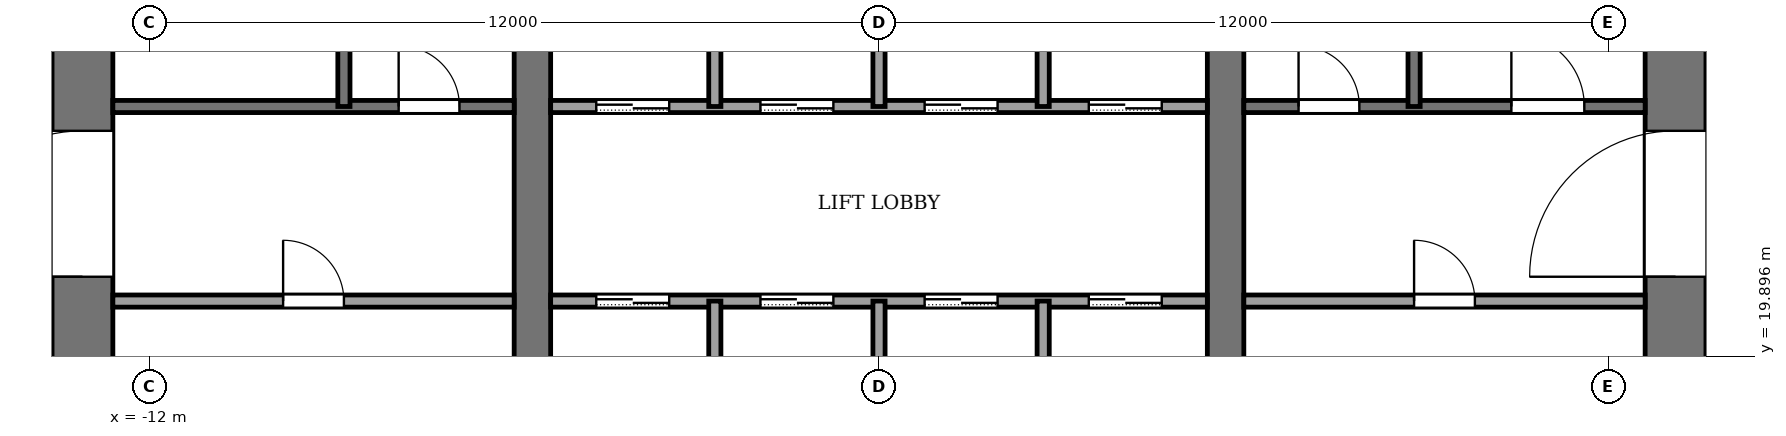
"""IFC4 building model, lengths in metres.
Left out: names, types, materials, properties, quantities, classifications, styles, units other than length and angle.
Written with IfcOpenShell. Run it as: python <this file> out.ifc"""

import sys

from ifc_helpers import new_model, si_unit, direction, frame, frame_2d, origin, place, context, subcontext, project, spatial, rectangle, extrude, element, fill, save


model = new_model("IFC4")
c1 = context("Model", 3, precision=1e-05, world=origin(), true_north=direction((0.0, 1.0)))
c2 = subcontext(c1, "Body", "Model", "MODEL_VIEW")
j1 = project(units=[si_unit("LENGTHUNIT", "METRE"), si_unit("PLANEANGLEUNIT", "RADIAN")], contexts=[c1])
p1 = place(None, origin())
s1 = spatial("IfcSite", under=j1, at=p1, CompositionType="ELEMENT")
p2 = place(p1, origin())
s2 = spatial("IfcBuilding", under=s1, at=p2, CompositionType="ELEMENT")
p3 = place(p2, frame((0.0, 0.0, 154.0)))
s3 = spatial("IfcBuildingStorey", under=s2, at=p3, CompositionType="ELEMENT", Elevation=154.0)
p4 = place(p3, frame((-13.1, 18.4, -0.13), z_axis=(0.0, 0.0, 1.0), x_axis=(0.0, 1.0, 0.0)))
e1 = element("IfcWall", 1, at=p4, inside=s3, PredefinedType="SHEAR", context=c2, shape_type="SweptSolid", body=[
    extrude(rectangle(XDim=19.2, YDim=1.0, at=frame_2d((9.6, 0.0))), origin(), (0.0, 0.0, 1.0), 4.0),
])
p5 = place(p4, frame((2.8, 0.0, 0.13)))
e2 = element("IfcOpeningElement", 2, at=p5, cuts=e1, PredefinedType="OPENING", context=c2, shape_type="SweptSolid", body=[
    extrude(rectangle(XDim=2.4, YDim=2.4, at=frame_2d((1.2, 1.2))), frame((0.0, 0.51, 0.0), z_axis=(0.0, -1.0, 0.0), x_axis=(1.0, 0.0, 0.0)), (0.0, 0.0, 1.0), 1.02),
])
p6 = place(p4, frame((13.4, 0.0, 0.13)))
e3 = element("IfcOpeningElement", 3, at=p6, cuts=e1, PredefinedType="OPENING", context=c2, shape_type="SweptSolid", body=[
    extrude(rectangle(XDim=1.4, YDim=2.2, at=frame_2d((0.7, 1.1))), frame((0.0, 0.51, 0.0), z_axis=(0.0, -1.0, 0.0), x_axis=(1.0, 0.0, 0.0)), (0.0, 0.0, 1.0), 1.02),
])
p7 = place(p3, frame((13.1, 18.4, -0.13), z_axis=(0.0, 0.0, 1.0), x_axis=(0.0, 1.0, 0.0)))
e4 = element("IfcWall", 4, at=p7, inside=s3, PredefinedType="SHEAR", context=c2, shape_type="SweptSolid", body=[
    extrude(rectangle(XDim=19.2, YDim=1.0, at=frame_2d((9.6, 0.0))), origin(), (0.0, 0.0, 1.0), 4.0),
])
p8 = place(p7, frame((2.8, 0.0, 0.13)))
e5 = element("IfcOpeningElement", 5, at=p8, cuts=e4, PredefinedType="OPENING", context=c2, shape_type="SweptSolid", body=[
    extrude(rectangle(XDim=2.4, YDim=2.4, at=frame_2d((1.2, 1.2))), frame((0.0, 0.51, 0.0), z_axis=(0.0, -1.0, 0.0), x_axis=(1.0, 0.0, 0.0)), (0.0, 0.0, 1.0), 1.02),
])
p9 = place(p7, frame((13.3, 0.0, 0.13)))
e6 = element("IfcOpeningElement", 6, at=p9, cuts=e4, PredefinedType="OPENING", context=c2, shape_type="SweptSolid", body=[
    extrude(rectangle(XDim=2.4, YDim=2.4, at=frame_2d((1.2, 1.2))), frame((0.0, 0.51, 0.0), z_axis=(0.0, -1.0, 0.0), x_axis=(1.0, 0.0, 0.0)), (0.0, 0.0, 1.0), 1.02),
])
p10 = place(p3, frame((-5.7, 18.4, -0.13), z_axis=(0.0, 0.0, 1.0), x_axis=(0.0, 1.0, 0.0)))
e7 = element("IfcWall", 7, at=p10, inside=s3, PredefinedType="SHEAR", context=c2, shape_type="SweptSolid", body=[
    extrude(rectangle(XDim=19.2, YDim=0.6, at=frame_2d((9.6, 0.0))), origin(), (0.0, 0.0, 1.0), 4.0),
])
p11 = place(p10, frame((8.35, 0.0, 0.13)))
e8 = element("IfcOpeningElement", 8, at=p11, cuts=e7, PredefinedType="OPENING", context=c2, shape_type="SweptSolid", body=[
    extrude(rectangle(XDim=0.9, YDim=2.1, at=frame_2d((0.45, 1.05))), frame((0.0, 0.31, 0.0), z_axis=(0.0, -1.0, 0.0), x_axis=(1.0, 0.0, 0.0)), (0.0, 0.0, 1.0), 0.62),
])
p12 = place(p3, frame((5.7, 18.4, -0.13), z_axis=(0.0, 0.0, 1.0), x_axis=(0.0, 1.0, 0.0)))
e9 = element("IfcWall", 9, at=p12, inside=s3, PredefinedType="SHEAR", context=c2, shape_type="SweptSolid", body=[
    extrude(rectangle(XDim=19.2, YDim=0.6, at=frame_2d((9.6, 0.0))), origin(), (0.0, 0.0, 1.0), 4.0),
])
p13 = place(p12, frame((13.3, 0.0, 0.13)))
e10 = element("IfcOpeningElement", 10, at=p13, cuts=e9, PredefinedType="OPENING", context=c2, shape_type="SweptSolid", body=[
    extrude(rectangle(XDim=2.4, YDim=2.4, at=frame_2d((1.2, 1.2))), frame((0.0, 0.31, 0.0), z_axis=(0.0, -1.0, 0.0), x_axis=(1.0, 0.0, 0.0)), (0.0, 0.0, 1.0), 0.62),
])
p14 = place(p3, frame((-12.6, 20.8, 0.0), z_axis=(0.0, 0.0, 1.0), x_axis=(1.0, 0.0, 0.0)))
e11 = element("IfcWall", 11, at=p14, inside=s3, PredefinedType="PARTITIONING", context=c2, shape_type="SweptSolid", body=[
    extrude(rectangle(XDim=6.6, YDim=0.2, at=frame_2d((3.3, 0.0))), origin(), (0.0, 0.0, 1.0), 3.87),
])
p15 = place(p14, frame((2.8, 0.0, 0.0)))
e12 = element("IfcOpeningElement", 12, at=p15, cuts=e11, PredefinedType="OPENING", context=c2, shape_type="SweptSolid", body=[
    extrude(rectangle(XDim=1.0, YDim=2.1, at=frame_2d((0.5, 1.05))), frame((0.0, 0.11, 0.0), z_axis=(0.0, -1.0, 0.0), x_axis=(1.0, 0.0, 0.0)), (0.0, 0.0, 1.0), 0.22),
])
p16 = place(p3, frame((-5.4, 20.8, 0.0), z_axis=(0.0, 0.0, 1.0), x_axis=(1.0, 0.0, 0.0)))
e13 = element("IfcWall", 13, at=p16, inside=s3, PredefinedType="PARTITIONING", context=c2, shape_type="SweptSolid", body=[
    extrude(rectangle(XDim=10.8, YDim=0.2, at=frame_2d((5.4, 0.0))), origin(), (0.0, 0.0, 1.0), 3.87),
])
p17 = place(p16, frame((0.75, 0.0, 0.0)))
e14 = element("IfcOpeningElement", 14, at=p17, cuts=e13, PredefinedType="OPENING", context=c2, shape_type="SweptSolid", body=[
    extrude(rectangle(XDim=1.2, YDim=2.2, at=frame_2d((0.6, 1.1))), frame((0.0, 0.11, 0.0), z_axis=(0.0, -1.0, 0.0), x_axis=(1.0, 0.0, 0.0)), (0.0, 0.0, 1.0), 0.22),
])
p18 = place(p16, frame((3.45, 0.0, 0.0)))
e15 = element("IfcOpeningElement", 15, at=p18, cuts=e13, PredefinedType="OPENING", context=c2, shape_type="SweptSolid", body=[
    extrude(rectangle(XDim=1.2, YDim=2.2, at=frame_2d((0.6, 1.1))), frame((0.0, 0.11, 0.0), z_axis=(0.0, -1.0, 0.0), x_axis=(1.0, 0.0, 0.0)), (0.0, 0.0, 1.0), 0.22),
])
p19 = place(p16, frame((6.15, 0.0, 0.0)))
e16 = element("IfcOpeningElement", 16, at=p19, cuts=e13, PredefinedType="OPENING", context=c2, shape_type="SweptSolid", body=[
    extrude(rectangle(XDim=1.2, YDim=2.2, at=frame_2d((0.6, 1.1))), frame((0.0, 0.11, 0.0), z_axis=(0.0, -1.0, 0.0), x_axis=(1.0, 0.0, 0.0)), (0.0, 0.0, 1.0), 0.22),
])
p20 = place(p16, frame((8.85, 0.0, 0.0)))
e17 = element("IfcOpeningElement", 17, at=p20, cuts=e13, PredefinedType="OPENING", context=c2, shape_type="SweptSolid", body=[
    extrude(rectangle(XDim=1.2, YDim=2.2, at=frame_2d((0.6, 1.1))), frame((0.0, 0.11, 0.0), z_axis=(0.0, -1.0, 0.0), x_axis=(1.0, 0.0, 0.0)), (0.0, 0.0, 1.0), 0.22),
])
p21 = place(p3, frame((6.0, 20.8, 0.0), z_axis=(0.0, 0.0, 1.0), x_axis=(1.0, 0.0, 0.0)))
e18 = element("IfcWall", 18, at=p21, inside=s3, PredefinedType="PARTITIONING", context=c2, shape_type="SweptSolid", body=[
    extrude(rectangle(XDim=6.6, YDim=0.2, at=frame_2d((3.3, 0.0))), origin(), (0.0, 0.0, 1.0), 3.87),
])
p22 = place(p21, frame((2.8, 0.0, 0.0)))
e19 = element("IfcOpeningElement", 19, at=p22, cuts=e18, PredefinedType="OPENING", context=c2, shape_type="SweptSolid", body=[
    extrude(rectangle(XDim=1.0, YDim=2.1, at=frame_2d((0.5, 1.05))), frame((0.0, 0.11, 0.0), z_axis=(0.0, -1.0, 0.0), x_axis=(1.0, 0.0, 0.0)), (0.0, 0.0, 1.0), 0.22),
])
p23 = place(p3, frame((-12.6, 24.0, 0.0), z_axis=(0.0, 0.0, 1.0), x_axis=(1.0, 0.0, 0.0)))
e20 = element("IfcWall", 20, at=p23, inside=s3, PredefinedType="PARTITIONING", context=c2, shape_type="SweptSolid", body=[
    extrude(rectangle(XDim=6.6, YDim=0.2, at=frame_2d((3.3, 0.0))), origin(), (0.0, 0.0, 1.0), 3.87),
])
p24 = place(p23, frame((4.7, 0.0, 0.0)))
e21 = element("IfcOpeningElement", 21, at=p24, cuts=e20, PredefinedType="OPENING", context=c2, shape_type="SweptSolid", body=[
    extrude(rectangle(XDim=1.0, YDim=2.1, at=frame_2d((0.5, 1.05))), frame((0.0, 0.11, 0.0), z_axis=(0.0, -1.0, 0.0), x_axis=(1.0, 0.0, 0.0)), (0.0, 0.0, 1.0), 0.22),
])
p25 = place(p3, frame((-5.4, 24.0, 0.0), z_axis=(0.0, 0.0, 1.0), x_axis=(1.0, 0.0, 0.0)))
e22 = element("IfcWall", 22, at=p25, inside=s3, PredefinedType="PARTITIONING", context=c2, shape_type="SweptSolid", body=[
    extrude(rectangle(XDim=10.8, YDim=0.2, at=frame_2d((5.4, 0.0))), origin(), (0.0, 0.0, 1.0), 3.87),
])
p26 = place(p25, frame((0.75, 0.0, 0.0)))
e23 = element("IfcOpeningElement", 23, at=p26, cuts=e22, PredefinedType="OPENING", context=c2, shape_type="SweptSolid", body=[
    extrude(rectangle(XDim=1.2, YDim=2.2, at=frame_2d((0.6, 1.1))), frame((0.0, 0.11, 0.0), z_axis=(0.0, -1.0, 0.0), x_axis=(1.0, 0.0, 0.0)), (0.0, 0.0, 1.0), 0.22),
])
p27 = place(p25, frame((3.45, 0.0, 0.0)))
e24 = element("IfcOpeningElement", 24, at=p27, cuts=e22, PredefinedType="OPENING", context=c2, shape_type="SweptSolid", body=[
    extrude(rectangle(XDim=1.2, YDim=2.2, at=frame_2d((0.6, 1.1))), frame((0.0, 0.11, 0.0), z_axis=(0.0, -1.0, 0.0), x_axis=(1.0, 0.0, 0.0)), (0.0, 0.0, 1.0), 0.22),
])
p28 = place(p25, frame((6.15, 0.0, 0.0)))
e25 = element("IfcOpeningElement", 25, at=p28, cuts=e22, PredefinedType="OPENING", context=c2, shape_type="SweptSolid", body=[
    extrude(rectangle(XDim=1.2, YDim=2.2, at=frame_2d((0.6, 1.1))), frame((0.0, 0.11, 0.0), z_axis=(0.0, -1.0, 0.0), x_axis=(1.0, 0.0, 0.0)), (0.0, 0.0, 1.0), 0.22),
])
p29 = place(p25, frame((8.85, 0.0, 0.0)))
e26 = element("IfcOpeningElement", 26, at=p29, cuts=e22, PredefinedType="OPENING", context=c2, shape_type="SweptSolid", body=[
    extrude(rectangle(XDim=1.2, YDim=2.2, at=frame_2d((0.6, 1.1))), frame((0.0, 0.11, 0.0), z_axis=(0.0, -1.0, 0.0), x_axis=(1.0, 0.0, 0.0)), (0.0, 0.0, 1.0), 0.22),
])
p30 = place(p3, frame((6.0, 24.0, 0.0), z_axis=(0.0, 0.0, 1.0), x_axis=(1.0, 0.0, 0.0)))
e27 = element("IfcWall", 27, at=p30, inside=s3, PredefinedType="PARTITIONING", context=c2, shape_type="SweptSolid", body=[
    extrude(rectangle(XDim=6.6, YDim=0.2, at=frame_2d((3.3, 0.0))), origin(), (0.0, 0.0, 1.0), 3.87),
])
p31 = place(p30, frame((0.9, 0.0, 0.0)))
e28 = element("IfcOpeningElement", 28, at=p31, cuts=e27, PredefinedType="OPENING", context=c2, shape_type="SweptSolid", body=[
    extrude(rectangle(XDim=1.0, YDim=2.1, at=frame_2d((0.5, 1.05))), frame((0.0, 0.11, 0.0), z_axis=(0.0, -1.0, 0.0), x_axis=(1.0, 0.0, 0.0)), (0.0, 0.0, 1.0), 0.22),
])
p32 = place(p30, frame((4.4, 0.0, 0.0)))
e29 = element("IfcOpeningElement", 29, at=p32, cuts=e27, PredefinedType="OPENING", context=c2, shape_type="SweptSolid", body=[
    extrude(rectangle(XDim=1.2, YDim=2.2, at=frame_2d((0.6, 1.1))), frame((0.0, 0.11, 0.0), z_axis=(0.0, -1.0, 0.0), x_axis=(1.0, 0.0, 0.0)), (0.0, 0.0, 1.0), 0.22),
])
p33 = place(p3, frame((-8.8, 24.0, 0.0), z_axis=(0.0, 0.0, 1.0), x_axis=(0.0, 1.0, 0.0)))
e30 = element("IfcWall", 30, at=p33, inside=s3, PredefinedType="PARTITIONING", context=c2, shape_type="SweptSolid", body=[
    extrude(rectangle(XDim=7.4, YDim=0.2, at=frame_2d((3.7, 0.0))), origin(), (0.0, 0.0, 1.0), 3.87),
])
p34 = place(p3, frame((-2.7, 18.4, 0.0), z_axis=(0.0, 0.0, 1.0), x_axis=(0.0, 1.0, 0.0)))
e31 = element("IfcWall", 31, at=p34, inside=s3, PredefinedType="PARTITIONING", context=c2, shape_type="SweptSolid", body=[
    extrude(rectangle(XDim=2.4, YDim=0.2, at=frame_2d((1.2, 0.0))), origin(), (0.0, 0.0, 1.0), 3.87),
])
p35 = place(p3, frame((-2.7, 24.0, 0.0), z_axis=(0.0, 0.0, 1.0), x_axis=(0.0, 1.0, 0.0)))
e32 = element("IfcWall", 32, at=p35, inside=s3, PredefinedType="PARTITIONING", context=c2, shape_type="SweptSolid", body=[
    extrude(rectangle(XDim=2.4, YDim=0.2, at=frame_2d((1.2, 0.0))), origin(), (0.0, 0.0, 1.0), 3.87),
])
p36 = place(p3, frame((0.0, 18.4, 0.0), z_axis=(0.0, 0.0, 1.0), x_axis=(0.0, 1.0, 0.0)))
e33 = element("IfcWall", 33, at=p36, inside=s3, PredefinedType="PARTITIONING", context=c2, shape_type="SweptSolid", body=[
    extrude(rectangle(XDim=2.4, YDim=0.2, at=frame_2d((1.2, 0.0))), origin(), (0.0, 0.0, 1.0), 3.87),
])
p37 = place(p3, frame((0.0, 24.0, 0.0), z_axis=(0.0, 0.0, 1.0), x_axis=(0.0, 1.0, 0.0)))
e34 = element("IfcWall", 34, at=p37, inside=s3, PredefinedType="PARTITIONING", context=c2, shape_type="SweptSolid", body=[
    extrude(rectangle(XDim=2.4, YDim=0.2, at=frame_2d((1.2, 0.0))), origin(), (0.0, 0.0, 1.0), 3.87),
])
p38 = place(p3, frame((2.7, 18.4, 0.0), z_axis=(0.0, 0.0, 1.0), x_axis=(0.0, 1.0, 0.0)))
e35 = element("IfcWall", 35, at=p38, inside=s3, PredefinedType="PARTITIONING", context=c2, shape_type="SweptSolid", body=[
    extrude(rectangle(XDim=2.4, YDim=0.2, at=frame_2d((1.2, 0.0))), origin(), (0.0, 0.0, 1.0), 3.87),
])
p39 = place(p3, frame((2.7, 24.0, 0.0), z_axis=(0.0, 0.0, 1.0), x_axis=(0.0, 1.0, 0.0)))
e36 = element("IfcWall", 36, at=p39, inside=s3, PredefinedType="PARTITIONING", context=c2, shape_type="SweptSolid", body=[
    extrude(rectangle(XDim=2.4, YDim=0.2, at=frame_2d((1.2, 0.0))), origin(), (0.0, 0.0, 1.0), 3.87),
])
p40 = place(p3, frame((8.8, 24.0, 0.0), z_axis=(0.0, 0.0, 1.0), x_axis=(0.0, 1.0, 0.0)))
e37 = element("IfcWall", 37, at=p40, inside=s3, PredefinedType="PARTITIONING", context=c2, shape_type="SweptSolid", body=[
    extrude(rectangle(XDim=7.4, YDim=0.2, at=frame_2d((3.7, 0.0))), origin(), (0.0, 0.0, 1.0), 3.87),
])
p41 = place(p17, origin())
e38 = element("IfcDoor", 38, at=p41, inside=s3, OperationType="SLIDING_TO_LEFT", PredefinedType="DOOR", context=c2, shape_type="SweptSolid", body=[
    extrude(rectangle(XDim=1.2, YDim=2.2, at=frame_2d((0.6, 1.1))), frame((0.0, 0.025, 0.0), z_axis=(0.0, -1.0, 0.0), x_axis=(1.0, 0.0, 0.0)), (0.0, 0.0, 1.0), 0.05),
])
fill(e14, e38)
p42 = place(p18, origin())
e39 = element("IfcDoor", 39, at=p42, inside=s3, OperationType="SLIDING_TO_LEFT", PredefinedType="DOOR", context=c2, shape_type="SweptSolid", body=[
    extrude(rectangle(XDim=1.2, YDim=2.2, at=frame_2d((0.6, 1.1))), frame((0.0, 0.025, 0.0), z_axis=(0.0, -1.0, 0.0), x_axis=(1.0, 0.0, 0.0)), (0.0, 0.0, 1.0), 0.05),
])
fill(e15, e39)
p43 = place(p19, origin())
e40 = element("IfcDoor", 40, at=p43, inside=s3, OperationType="SLIDING_TO_LEFT", PredefinedType="DOOR", context=c2, shape_type="SweptSolid", body=[
    extrude(rectangle(XDim=1.2, YDim=2.2, at=frame_2d((0.6, 1.1))), frame((0.0, 0.025, 0.0), z_axis=(0.0, -1.0, 0.0), x_axis=(1.0, 0.0, 0.0)), (0.0, 0.0, 1.0), 0.05),
])
fill(e16, e40)
p44 = place(p20, origin())
e41 = element("IfcDoor", 41, at=p44, inside=s3, OperationType="SLIDING_TO_LEFT", PredefinedType="DOOR", context=c2, shape_type="SweptSolid", body=[
    extrude(rectangle(XDim=1.2, YDim=2.2, at=frame_2d((0.6, 1.1))), frame((0.0, 0.025, 0.0), z_axis=(0.0, -1.0, 0.0), x_axis=(1.0, 0.0, 0.0)), (0.0, 0.0, 1.0), 0.05),
])
fill(e17, e41)
p45 = place(p26, origin())
e42 = element("IfcDoor", 42, at=p45, inside=s3, OperationType="SLIDING_TO_LEFT", PredefinedType="DOOR", context=c2, shape_type="SweptSolid", body=[
    extrude(rectangle(XDim=1.2, YDim=2.2, at=frame_2d((0.6, 1.1))), frame((0.0, 0.025, 0.0), z_axis=(0.0, -1.0, 0.0), x_axis=(1.0, 0.0, 0.0)), (0.0, 0.0, 1.0), 0.05),
])
fill(e23, e42)
p46 = place(p27, origin())
e43 = element("IfcDoor", 43, at=p46, inside=s3, OperationType="SLIDING_TO_LEFT", PredefinedType="DOOR", context=c2, shape_type="SweptSolid", body=[
    extrude(rectangle(XDim=1.2, YDim=2.2, at=frame_2d((0.6, 1.1))), frame((0.0, 0.025, 0.0), z_axis=(0.0, -1.0, 0.0), x_axis=(1.0, 0.0, 0.0)), (0.0, 0.0, 1.0), 0.05),
])
fill(e24, e43)
p47 = place(p28, origin())
e44 = element("IfcDoor", 44, at=p47, inside=s3, OperationType="SLIDING_TO_LEFT", PredefinedType="DOOR", context=c2, shape_type="SweptSolid", body=[
    extrude(rectangle(XDim=1.2, YDim=2.2, at=frame_2d((0.6, 1.1))), frame((0.0, 0.025, 0.0), z_axis=(0.0, -1.0, 0.0), x_axis=(1.0, 0.0, 0.0)), (0.0, 0.0, 1.0), 0.05),
])
fill(e25, e44)
p48 = place(p29, origin())
e45 = element("IfcDoor", 45, at=p48, inside=s3, OperationType="SLIDING_TO_LEFT", PredefinedType="DOOR", context=c2, shape_type="SweptSolid", body=[
    extrude(rectangle(XDim=1.2, YDim=2.2, at=frame_2d((0.6, 1.1))), frame((0.0, 0.025, 0.0), z_axis=(0.0, -1.0, 0.0), x_axis=(1.0, 0.0, 0.0)), (0.0, 0.0, 1.0), 0.05),
])
fill(e26, e45)
p49 = place(p15, origin())
e46 = element("IfcDoor", 46, at=p49, inside=s3, OperationType="SINGLE_SWING_LEFT", PredefinedType="DOOR", context=c2, shape_type="SweptSolid", body=[
    extrude(rectangle(XDim=1.0, YDim=2.1, at=frame_2d((0.5, 1.05))), frame((0.0, 0.025, 0.0), z_axis=(0.0, -1.0, 0.0), x_axis=(1.0, 0.0, 0.0)), (0.0, 0.0, 1.0), 0.05),
])
fill(e12, e46)
p50 = place(p22, origin())
e47 = element("IfcDoor", 47, at=p50, inside=s3, OperationType="SINGLE_SWING_RIGHT", PredefinedType="DOOR", context=c2, shape_type="SweptSolid", body=[
    extrude(rectangle(XDim=1.0, YDim=2.1, at=frame_2d((0.5, 1.05))), frame((0.0, 0.025, 0.0), z_axis=(0.0, -1.0, 0.0), x_axis=(1.0, 0.0, 0.0)), (0.0, 0.0, 1.0), 0.05),
])
fill(e19, e47)
p51 = place(p24, origin())
e48 = element("IfcDoor", 48, at=p51, inside=s3, OperationType="SINGLE_SWING_RIGHT", PredefinedType="DOOR", context=c2, shape_type="SweptSolid", body=[
    extrude(rectangle(XDim=1.0, YDim=2.1, at=frame_2d((0.5, 1.05))), frame((0.0, 0.025, 0.0), z_axis=(0.0, -1.0, 0.0), x_axis=(1.0, 0.0, 0.0)), (0.0, 0.0, 1.0), 0.05),
])
fill(e21, e48)
p52 = place(p31, origin())
e49 = element("IfcDoor", 49, at=p52, inside=s3, OperationType="SINGLE_SWING_LEFT", PredefinedType="DOOR", context=c2, shape_type="SweptSolid", body=[
    extrude(rectangle(XDim=1.0, YDim=2.1, at=frame_2d((0.5, 1.05))), frame((0.0, 0.025, 0.0), z_axis=(0.0, -1.0, 0.0), x_axis=(1.0, 0.0, 0.0)), (0.0, 0.0, 1.0), 0.05),
])
fill(e28, e49)
p53 = place(p32, origin())
e50 = element("IfcDoor", 50, at=p53, inside=s3, OperationType="SINGLE_SWING_LEFT", PredefinedType="DOOR", context=c2, shape_type="SweptSolid", body=[
    extrude(rectangle(XDim=1.2, YDim=2.2, at=frame_2d((0.6, 1.1))), frame((0.0, 0.025, 0.0), z_axis=(0.0, -1.0, 0.0), x_axis=(1.0, 0.0, 0.0)), (0.0, 0.0, 1.0), 0.05),
])
fill(e29, e50)
p54 = place(p5, origin())
e51 = element("IfcDoor", 51, at=p54, inside=s3, OperationType="DOUBLE_DOOR_SINGLE_SWING", PredefinedType="DOOR", context=c2, shape_type="SweptSolid", body=[
    extrude(rectangle(XDim=2.4, YDim=2.4, at=frame_2d((1.2, 1.2))), frame((0.0, 0.025, 0.0), z_axis=(0.0, -1.0, 0.0), x_axis=(1.0, 0.0, 0.0)), (0.0, 0.0, 1.0), 0.05),
])
fill(e2, e51)
p55 = place(p8, origin())
e52 = element("IfcDoor", 52, at=p55, inside=s3, OperationType="DOUBLE_DOOR_SINGLE_SWING", PredefinedType="DOOR", context=c2, shape_type="SweptSolid", body=[
    extrude(rectangle(XDim=2.4, YDim=2.4, at=frame_2d((1.2, 1.2))), frame((0.0, 0.025, 0.0), z_axis=(0.0, -1.0, 0.0), x_axis=(1.0, 0.0, 0.0)), (0.0, 0.0, 1.0), 0.05),
])
fill(e5, e52)
save(model, sys.argv[1])
